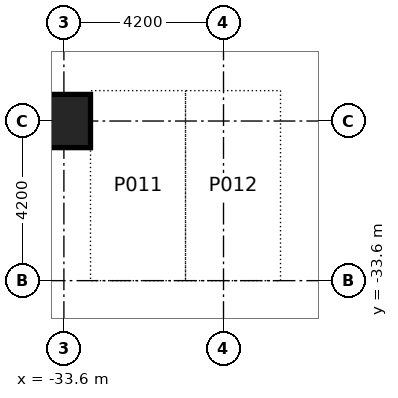
"""IFC4 building model, lengths in metres.
Left out: names, types, materials, properties, quantities, classifications, styles, units other than length and angle.
Written with IfcOpenShell. Run it as: python <this file> out.ifc"""

import sys

from ifc_helpers import new_model, si_unit, direction, frame, origin, origin_2d, place, context, subcontext, project, spatial, rectangle, extrude, element, save


model = new_model("IFC4")
c1 = context("Model", 3, precision=1e-05, world=origin(), true_north=direction((0.0, 1.0)))
c2 = subcontext(c1, "Body", "Model", "MODEL_VIEW")
j1 = project(units=[si_unit("LENGTHUNIT", "METRE"), si_unit("PLANEANGLEUNIT", "RADIAN")], contexts=[c1])
p1 = place(None, origin())
s1 = spatial("IfcSite", under=j1, at=p1, CompositionType="ELEMENT")
p2 = place(p1, origin())
s2 = spatial("IfcBuilding", under=s1, at=p2, CompositionType="ELEMENT")
p3 = place(p2, frame((0.0, 0.0, -8.4)))
s3 = spatial("IfcBuildingStorey", under=s2, at=p3, CompositionType="ELEMENT", Elevation=-8.4)
p4 = place(p3, frame((-33.6, -29.4, -0.5), z_axis=(0.0, 0.0, 1.0), x_axis=(1.0, 0.0, 0.0)))
e1 = element("IfcColumn", 1, at=p4, inside=s3, PredefinedType="COLUMN", context=c2, shape_type="SweptSolid", body=[
    extrude(rectangle(XDim=1.4, YDim=1.4, at=origin_2d()), origin(), (0.0, 0.0, 1.0), 4.7),
])
save(model, sys.argv[1])
